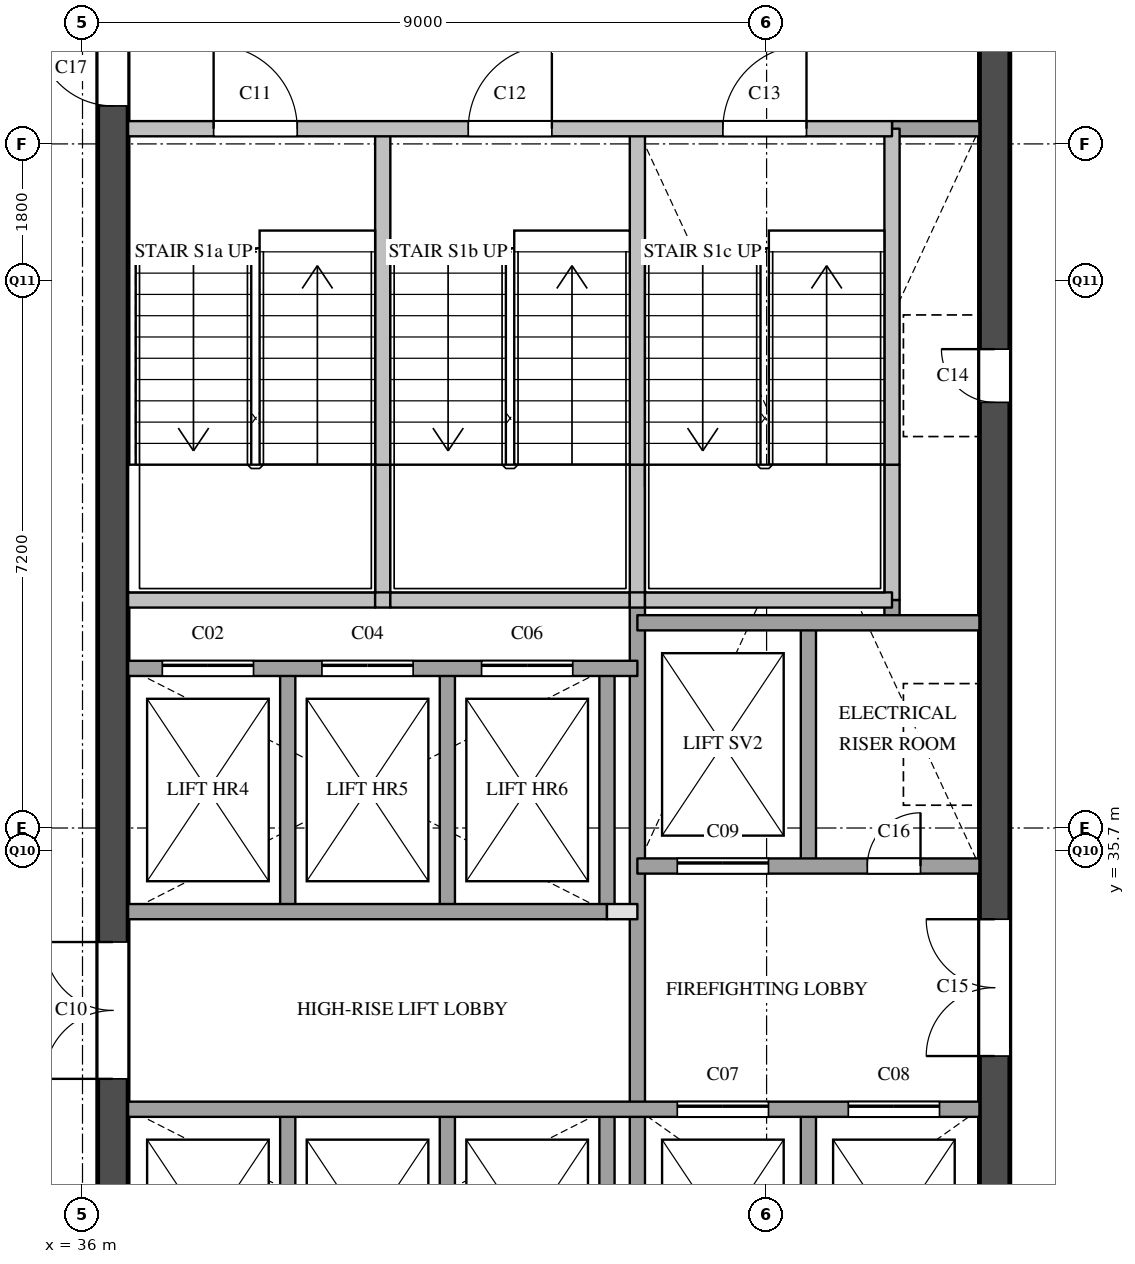
"""IFC4 building model, lengths in metres.
Left out: names, types, materials, properties, quantities, classifications, styles, units other than length and angle.
Written with IfcOpenShell. Run it as: python <this file> out.ifc"""

import sys

from ifc_helpers import new_model, si_unit, direction, frame, frame_2d, origin, place, context, subcontext, project, spatial, rectangle, extrude, element, fill, save


model = new_model("IFC4")
c1 = context("Model", 3, precision=1e-05, world=origin(), true_north=direction((0.0, 1.0)))
c2 = subcontext(c1, "Body", "Model", "MODEL_VIEW")
j1 = project(units=[si_unit("LENGTHUNIT", "METRE"), si_unit("PLANEANGLEUNIT", "RADIAN")], contexts=[c1])
p1 = place(None, origin())
s1 = spatial("IfcSite", under=j1, at=p1, CompositionType="ELEMENT")
p2 = place(p1, origin())
s2 = spatial("IfcBuilding", under=s1, at=p2, CompositionType="ELEMENT")
p3 = place(p2, frame((0.0, 0.0, 265.7)))
s3 = spatial("IfcBuildingStorey", under=s2, at=p3, CompositionType="ELEMENT", Elevation=265.7)
p4 = place(p3, frame((36.4, 29.1, 0.0), z_axis=(0.0, 0.0, 1.0), x_axis=(0.0, 1.0, 0.0)))
e1 = element("IfcWall", 1, at=p4, inside=s3, PredefinedType="SHEAR", context=c2, shape_type="SweptSolid", body=[
    extrude(rectangle(XDim=20.3, YDim=0.4, at=frame_2d((10.15, 0.0))), origin(), (0.0, 0.0, 1.0), 3.6),
])
p5 = place(p4, frame((3.6, 0.0, 0.0)))
e2 = element("IfcOpeningElement", 2, at=p5, cuts=e1, PredefinedType="OPENING", context=c2, shape_type="SweptSolid", body=[
    extrude(rectangle(XDim=1.8, YDim=2.1, at=frame_2d((0.9, 1.05))), frame((0.0, 0.21, 0.0), z_axis=(0.0, -1.0, 0.0), x_axis=(1.0, 0.0, 0.0)), (0.0, 0.0, 1.0), 0.42),
])
p6 = place(p4, frame((16.4, 0.0, 0.0)))
e3 = element("IfcOpeningElement", 3, at=p6, cuts=e1, PredefinedType="OPENING", context=c2, shape_type="SweptSolid", body=[
    extrude(rectangle(XDim=1.0, YDim=2.1, at=frame_2d((0.5, 1.05))), frame((0.0, 0.21, 0.0), z_axis=(0.0, -1.0, 0.0), x_axis=(1.0, 0.0, 0.0)), (0.0, 0.0, 1.0), 0.42),
])
p7 = place(p3, frame((48.0, 29.1, 0.0), z_axis=(0.0, 0.0, 1.0), x_axis=(0.0, 1.0, 0.0)))
e4 = element("IfcWall", 4, at=p7, inside=s3, PredefinedType="SHEAR", context=c2, shape_type="SweptSolid", body=[
    extrude(rectangle(XDim=20.3, YDim=0.4, at=frame_2d((10.15, 0.0))), origin(), (0.0, 0.0, 1.0), 3.6),
])
p8 = place(p7, frame((12.5, 0.0, 0.0)))
e5 = element("IfcOpeningElement", 5, at=p8, cuts=e4, PredefinedType="OPENING", context=c2, shape_type="SweptSolid", body=[
    extrude(rectangle(XDim=0.7, YDim=2.1, at=frame_2d((0.35, 1.05))), frame((0.0, 0.21, 0.0), z_axis=(0.0, -1.0, 0.0), x_axis=(1.0, 0.0, 0.0)), (0.0, 0.0, 1.0), 0.42),
])
p9 = place(p7, frame((3.9, 0.0, 0.0)))
e6 = element("IfcOpeningElement", 6, at=p9, cuts=e4, PredefinedType="OPENING", context=c2, shape_type="SweptSolid", body=[
    extrude(rectangle(XDim=1.8, YDim=2.1, at=frame_2d((0.9, 1.05))), frame((0.0, 0.21, 0.0), z_axis=(0.0, -1.0, 0.0), x_axis=(1.0, 0.0, 0.0)), (0.0, 0.0, 1.0), 0.42),
])
p10 = place(p3, frame((38.7, 29.1, 0.0), z_axis=(0.0, 0.0, 1.0), x_axis=(0.0, 1.0, 0.0)))
e7 = element("IfcWall", 7, at=p10, inside=s3, PredefinedType="SOLIDWALL", context=c2, shape_type="SweptSolid", body=[
    extrude(rectangle(XDim=3.2, YDim=0.2, at=frame_2d((1.6, 0.0))), origin(), (0.0, 0.0, 1.0), 3.6),
])
p11 = place(p3, frame((38.7, 34.9, 0.0), z_axis=(0.0, 0.0, 1.0), x_axis=(0.0, 1.0, 0.0)))
e8 = element("IfcWall", 8, at=p11, inside=s3, PredefinedType="SOLIDWALL", context=c2, shape_type="SweptSolid", body=[
    extrude(rectangle(XDim=3.2, YDim=0.2, at=frame_2d((1.6, 0.0))), origin(), (0.0, 0.0, 1.0), 3.6),
])
p12 = place(p3, frame((39.95, 39.0, 0.0), z_axis=(0.0, 0.0, 1.0), x_axis=(0.0, 1.0, 0.0)))
e9 = element("IfcWall", 9, at=p12, inside=s3, PredefinedType="SOLIDWALL", context=c2, shape_type="SweptSolid", body=[
    extrude(rectangle(XDim=1.78, YDim=0.2, at=frame_2d((0.89, 0.0))), origin(), (0.0, 0.0, 1.0), 3.6),
])
p13 = place(p3, frame((39.95, 40.78, 0.0), z_axis=(0.0, 0.0, 1.0), x_axis=(0.0, 1.0, 0.0)))
e10 = element("IfcWall", 10, at=p13, inside=s3, PredefinedType="SOLIDWALL", context=c2, shape_type="SweptSolid", body=[
    extrude(rectangle(XDim=4.42, YDim=0.2, at=frame_2d((2.21, 0.0))), origin(), (0.0, 0.0, 1.0), 3.6),
])
p14 = place(p3, frame((40.8, 29.1, 0.0), z_axis=(0.0, 0.0, 1.0), x_axis=(0.0, 1.0, 0.0)))
e11 = element("IfcWall", 11, at=p14, inside=s3, PredefinedType="SOLIDWALL", context=c2, shape_type="SweptSolid", body=[
    extrude(rectangle(XDim=3.2, YDim=0.2, at=frame_2d((1.6, 0.0))), origin(), (0.0, 0.0, 1.0), 3.6),
])
p15 = place(p3, frame((40.8, 34.9, 0.0), z_axis=(0.0, 0.0, 1.0), x_axis=(0.0, 1.0, 0.0)))
e12 = element("IfcWall", 12, at=p15, inside=s3, PredefinedType="SOLIDWALL", context=c2, shape_type="SweptSolid", body=[
    extrude(rectangle(XDim=3.2, YDim=0.2, at=frame_2d((1.6, 0.0))), origin(), (0.0, 0.0, 1.0), 3.6),
])
p16 = place(p3, frame((42.9, 29.1, 0.0), z_axis=(0.0, 0.0, 1.0), x_axis=(0.0, 1.0, 0.0)))
e13 = element("IfcWall", 13, at=p16, inside=s3, PredefinedType="SOLIDWALL", context=c2, shape_type="SweptSolid", body=[
    extrude(rectangle(XDim=3.2, YDim=0.2, at=frame_2d((1.6, 0.0))), origin(), (0.0, 0.0, 1.0), 3.6),
])
p17 = place(p3, frame((42.9, 34.9, 0.0), z_axis=(0.0, 0.0, 1.0), x_axis=(0.0, 1.0, 0.0)))
e14 = element("IfcWall", 14, at=p17, inside=s3, PredefinedType="SOLIDWALL", context=c2, shape_type="SweptSolid", body=[
    extrude(rectangle(XDim=3.2, YDim=0.2, at=frame_2d((1.6, 0.0))), origin(), (0.0, 0.0, 1.0), 3.6),
])
p18 = place(p3, frame((43.3, 29.1, 0.0), z_axis=(0.0, 0.0, 1.0), x_axis=(0.0, 1.0, 0.0)))
e15 = element("IfcWall", 15, at=p18, inside=s3, PredefinedType="SOLIDWALL", context=c2, shape_type="SweptSolid", body=[
    extrude(rectangle(XDim=9.9, YDim=0.2, at=frame_2d((4.95, 0.0))), origin(), (0.0, 0.0, 1.0), 3.6),
])
p19 = place(p3, frame((43.3, 39.0, 0.0), z_axis=(0.0, 0.0, 1.0), x_axis=(0.0, 1.0, 0.0)))
e16 = element("IfcWall", 16, at=p19, inside=s3, PredefinedType="SOLIDWALL", context=c2, shape_type="SweptSolid", body=[
    extrude(rectangle(XDim=1.78, YDim=0.2, at=frame_2d((0.89, 0.0))), origin(), (0.0, 0.0, 1.0), 3.6),
])
p20 = place(p3, frame((43.3, 40.78, 0.0), z_axis=(0.0, 0.0, 1.0), x_axis=(0.0, 1.0, 0.0)))
e17 = element("IfcWall", 17, at=p20, inside=s3, PredefinedType="SOLIDWALL", context=c2, shape_type="SweptSolid", body=[
    extrude(rectangle(XDim=4.42, YDim=0.2, at=frame_2d((2.21, 0.0))), origin(), (0.0, 0.0, 1.0), 3.6),
])
for number, where, z_axis, x_axis in (
    (18, (45.55, 29.1, 0.0), (0.0, 0.0, 1.0), (0.0, 1.0, 0.0)),
    (19, (45.55, 35.5, 0.0), (0.0, 0.0, 1.0), (0.0, 1.0, 0.0)),
):
    element("IfcWall", number, at=place(p3, frame(where, z_axis=z_axis, x_axis=x_axis)), inside=s3, PredefinedType="SOLIDWALL", context=c2, shape_type="SweptSolid", body=[
        extrude(rectangle(XDim=3.2, YDim=0.2, at=frame_2d((1.6, 0.0))), origin(), (0.0, 0.0, 1.0), 3.6),
    ])
p21 = place(p3, frame((46.65, 38.7, 0.0), z_axis=(0.0, 0.0, 1.0), x_axis=(0.0, 1.0, 0.0)))
e20 = element("IfcWall", 20, at=p21, inside=s3, PredefinedType="SOLIDWALL", context=c2, shape_type="SweptSolid", body=[
    extrude(rectangle(XDim=0.3, YDim=0.2, at=frame_2d((0.15, 0.0))), origin(), (0.0, 0.0, 1.0), 3.6),
])
p22 = place(p3, frame((46.65, 39.0, 0.0), z_axis=(0.0, 0.0, 1.0), x_axis=(0.0, 1.0, 0.0)))
e21 = element("IfcWall", 21, at=p22, inside=s3, PredefinedType="SOLIDWALL", context=c2, shape_type="SweptSolid", body=[
    extrude(rectangle(XDim=1.78, YDim=0.2, at=frame_2d((0.89, 0.0))), origin(), (0.0, 0.0, 1.0), 3.6),
])
p23 = place(p3, frame((46.65, 40.78, 0.0), z_axis=(0.0, 0.0, 1.0), x_axis=(0.0, 1.0, 0.0)))
e22 = element("IfcWall", 22, at=p23, inside=s3, PredefinedType="SOLIDWALL", context=c2, shape_type="SweptSolid", body=[
    extrude(rectangle(XDim=4.42, YDim=0.2, at=frame_2d((2.21, 0.0))), origin(), (0.0, 0.0, 1.0), 3.6),
])
p24 = place(p3, frame((36.6, 32.3, 0.0), z_axis=(0.0, 0.0, 1.0), x_axis=(1.0, 0.0, 0.0)))
e23 = element("IfcWall", 23, at=p24, inside=s3, PredefinedType="SOLIDWALL", context=c2, shape_type="SweptSolid", body=[
    extrude(rectangle(XDim=11.2, YDim=0.2, at=frame_2d((5.6, 0.0))), origin(), (0.0, 0.0, 1.0), 3.6),
])
p25 = place(p24, frame((7.225, 0.0, 0.0)))
e24 = element("IfcOpeningElement", 24, at=p25, cuts=e23, PredefinedType="OPENING", context=c2, shape_type="SweptSolid", body=[
    extrude(rectangle(XDim=1.2, YDim=2.1, at=frame_2d((0.6, 1.05))), frame((0.0, 0.11, 0.0), z_axis=(0.0, -1.0, 0.0), x_axis=(1.0, 0.0, 0.0)), (0.0, 0.0, 1.0), 0.22),
])
p26 = place(p24, frame((9.475, 0.0, 0.0)))
e25 = element("IfcOpeningElement", 25, at=p26, cuts=e23, PredefinedType="OPENING", context=c2, shape_type="SweptSolid", body=[
    extrude(rectangle(XDim=1.2, YDim=2.1, at=frame_2d((0.6, 1.05))), frame((0.0, 0.11, 0.0), z_axis=(0.0, -1.0, 0.0), x_axis=(1.0, 0.0, 0.0)), (0.0, 0.0, 1.0), 0.22),
])
p27 = place(p3, frame((42.9, 34.9, 0.0), z_axis=(0.0, 0.0, 1.0), x_axis=(1.0, 0.0, 0.0)))
e26 = element("IfcWall", 26, at=p27, inside=s3, PredefinedType="PARTITIONING", context=c2, shape_type="SweptSolid", body=[
    extrude(rectangle(XDim=0.4, YDim=0.2, at=frame_2d((0.2, 0.0))), origin(), (0.0, 0.0, 1.0), 3.6),
])
p28 = place(p3, frame((36.6, 34.9, 0.0), z_axis=(0.0, 0.0, 1.0), x_axis=(1.0, 0.0, 0.0)))
e27 = element("IfcWall", 27, at=p28, inside=s3, PredefinedType="SOLIDWALL", context=c2, shape_type="SweptSolid", body=[
    extrude(rectangle(XDim=6.3, YDim=0.2, at=frame_2d((3.15, 0.0))), origin(), (0.0, 0.0, 1.0), 3.6),
])
p29 = place(p3, frame((43.3, 35.5, 0.0), z_axis=(0.0, 0.0, 1.0), x_axis=(1.0, 0.0, 0.0)))
e28 = element("IfcWall", 28, at=p29, inside=s3, PredefinedType="SOLIDWALL", context=c2, shape_type="SweptSolid", body=[
    extrude(rectangle(XDim=4.5, YDim=0.2, at=frame_2d((2.25, 0.0))), origin(), (0.0, 0.0, 1.0), 3.6),
])
p30 = place(p29, frame((0.525, 0.0, 0.0)))
e29 = element("IfcOpeningElement", 29, at=p30, cuts=e28, PredefinedType="OPENING", context=c2, shape_type="SweptSolid", body=[
    extrude(rectangle(XDim=1.2, YDim=2.1, at=frame_2d((0.6, 1.05))), frame((0.0, 0.11, 0.0), z_axis=(0.0, -1.0, 0.0), x_axis=(1.0, 0.0, 0.0)), (0.0, 0.0, 1.0), 0.22),
])
p31 = place(p29, frame((3.025, 0.0, 0.0)))
e30 = element("IfcOpeningElement", 30, at=p31, cuts=e28, PredefinedType="OPENING", context=c2, shape_type="SweptSolid", body=[
    extrude(rectangle(XDim=0.7, YDim=2.1, at=frame_2d((0.35, 1.05))), frame((0.0, 0.11, 0.0), z_axis=(0.0, -1.0, 0.0), x_axis=(1.0, 0.0, 0.0)), (0.0, 0.0, 1.0), 0.22),
])
p32 = place(p3, frame((36.6, 38.1, 0.0), z_axis=(0.0, 0.0, 1.0), x_axis=(1.0, 0.0, 0.0)))
e31 = element("IfcWall", 31, at=p32, inside=s3, PredefinedType="SOLIDWALL", context=c2, shape_type="SweptSolid", body=[
    extrude(rectangle(XDim=6.7, YDim=0.2, at=frame_2d((3.35, 0.0))), origin(), (0.0, 0.0, 1.0), 3.6),
])
p33 = place(p32, frame((0.45, 0.0, 0.0)))
e32 = element("IfcOpeningElement", 32, at=p33, cuts=e31, PredefinedType="OPENING", context=c2, shape_type="SweptSolid", body=[
    extrude(rectangle(XDim=1.2, YDim=2.1, at=frame_2d((0.6, 1.05))), frame((0.0, 0.11, 0.0), z_axis=(0.0, -1.0, 0.0), x_axis=(1.0, 0.0, 0.0)), (0.0, 0.0, 1.0), 0.22),
])
p34 = place(p32, frame((2.55, 0.0, 0.0)))
e33 = element("IfcOpeningElement", 33, at=p34, cuts=e31, PredefinedType="OPENING", context=c2, shape_type="SweptSolid", body=[
    extrude(rectangle(XDim=1.2, YDim=2.1, at=frame_2d((0.6, 1.05))), frame((0.0, 0.11, 0.0), z_axis=(0.0, -1.0, 0.0), x_axis=(1.0, 0.0, 0.0)), (0.0, 0.0, 1.0), 0.22),
])
p35 = place(p32, frame((4.65, 0.0, 0.0)))
e34 = element("IfcOpeningElement", 34, at=p35, cuts=e31, PredefinedType="OPENING", context=c2, shape_type="SweptSolid", body=[
    extrude(rectangle(XDim=1.2, YDim=2.1, at=frame_2d((0.6, 1.05))), frame((0.0, 0.11, 0.0), z_axis=(0.0, -1.0, 0.0), x_axis=(1.0, 0.0, 0.0)), (0.0, 0.0, 1.0), 0.22),
])
p36 = place(p3, frame((43.3, 38.7, 0.0), z_axis=(0.0, 0.0, 1.0), x_axis=(1.0, 0.0, 0.0)))
e35 = element("IfcWall", 35, at=p36, inside=s3, PredefinedType="SOLIDWALL", context=c2, shape_type="SweptSolid", body=[
    extrude(rectangle(XDim=4.5, YDim=0.2, at=frame_2d((2.25, 0.0))), origin(), (0.0, 0.0, 1.0), 3.6),
])
p37 = place(p3, frame((36.6, 39.0, 0.0), z_axis=(0.0, 0.0, 1.0), x_axis=(1.0, 0.0, 0.0)))
e36 = element("IfcWall", 36, at=p37, inside=s3, PredefinedType="SOLIDWALL", context=c2, shape_type="SweptSolid", body=[
    extrude(rectangle(XDim=3.25, YDim=0.2, at=frame_2d((1.625, 0.0))), origin(), (0.0, 0.0, 1.0), 3.6),
])
p38 = place(p3, frame((39.85, 39.0, 0.0), z_axis=(0.0, 0.0, 1.0), x_axis=(1.0, 0.0, 0.0)))
e37 = element("IfcWall", 37, at=p38, inside=s3, PredefinedType="SOLIDWALL", context=c2, shape_type="SweptSolid", body=[
    extrude(rectangle(XDim=0.2, YDim=0.2, at=frame_2d((0.1, 0.0))), origin(), (0.0, 0.0, 1.0), 3.6),
])
p39 = place(p3, frame((40.05, 39.0, 0.0), z_axis=(0.0, 0.0, 1.0), x_axis=(1.0, 0.0, 0.0)))
e38 = element("IfcWall", 38, at=p39, inside=s3, PredefinedType="SOLIDWALL", context=c2, shape_type="SweptSolid", body=[
    extrude(rectangle(XDim=3.15, YDim=0.2, at=frame_2d((1.575, 0.0))), origin(), (0.0, 0.0, 1.0), 3.6),
])
p40 = place(p3, frame((43.2, 39.0, 0.0), z_axis=(0.0, 0.0, 1.0), x_axis=(1.0, 0.0, 0.0)))
e39 = element("IfcWall", 39, at=p40, inside=s3, PredefinedType="SOLIDWALL", context=c2, shape_type="SweptSolid", body=[
    extrude(rectangle(XDim=0.2, YDim=0.2, at=frame_2d((0.1, 0.0))), origin(), (0.0, 0.0, 1.0), 3.6),
])
p41 = place(p3, frame((43.4, 39.0, 0.0), z_axis=(0.0, 0.0, 1.0), x_axis=(1.0, 0.0, 0.0)))
e40 = element("IfcWall", 40, at=p41, inside=s3, PredefinedType="SOLIDWALL", context=c2, shape_type="SweptSolid", body=[
    extrude(rectangle(XDim=3.25, YDim=0.2, at=frame_2d((1.625, 0.0))), origin(), (0.0, 0.0, 1.0), 3.6),
])
p42 = place(p3, frame((46.65, 45.2, 0.0), z_axis=(0.0, 0.0, 1.0), x_axis=(1.0, 0.0, 0.0)))
e41 = element("IfcWall", 41, at=p42, inside=s3, PredefinedType="SOLIDWALL", context=c2, shape_type="SweptSolid", body=[
    extrude(rectangle(XDim=1.15, YDim=0.2, at=frame_2d((0.575, 0.0))), origin(), (0.0, 0.0, 1.0), 3.6),
])
p43 = place(p3, frame((36.6, 45.2, 0.0), z_axis=(0.0, 0.0, 1.0), x_axis=(1.0, 0.0, 0.0)))
e42 = element("IfcWall", 42, at=p43, inside=s3, PredefinedType="SOLIDWALL", context=c2, shape_type="SweptSolid", body=[
    extrude(rectangle(XDim=10.05, YDim=0.2, at=frame_2d((5.025, 0.0))), origin(), (0.0, 0.0, 1.0), 3.6),
])
p44 = place(p43, frame((1.125, 0.0, 0.0)))
e43 = element("IfcOpeningElement", 43, at=p44, cuts=e42, PredefinedType="OPENING", context=c2, shape_type="SweptSolid", body=[
    extrude(rectangle(XDim=1.1, YDim=2.1, at=frame_2d((0.55, 1.05))), frame((0.0, 0.11, 0.0), z_axis=(0.0, -1.0, 0.0), x_axis=(1.0, 0.0, 0.0)), (0.0, 0.0, 1.0), 0.22),
])
p45 = place(p43, frame((4.475, 0.0, 0.0)))
e44 = element("IfcOpeningElement", 44, at=p45, cuts=e42, PredefinedType="OPENING", context=c2, shape_type="SweptSolid", body=[
    extrude(rectangle(XDim=1.1, YDim=2.1, at=frame_2d((0.55, 1.05))), frame((0.0, 0.11, 0.0), z_axis=(0.0, -1.0, 0.0), x_axis=(1.0, 0.0, 0.0)), (0.0, 0.0, 1.0), 0.22),
])
p46 = place(p43, frame((7.825, 0.0, 0.0)))
e45 = element("IfcOpeningElement", 45, at=p46, cuts=e42, PredefinedType="OPENING", context=c2, shape_type="SweptSolid", body=[
    extrude(rectangle(XDim=1.1, YDim=2.1, at=frame_2d((0.55, 1.05))), frame((0.0, 0.11, 0.0), z_axis=(0.0, -1.0, 0.0), x_axis=(1.0, 0.0, 0.0)), (0.0, 0.0, 1.0), 0.22),
])
p47 = place(p33, origin())
e46 = element("IfcDoor", 46, at=p47, inside=s3, OperationType="SLIDING_TO_LEFT", PredefinedType="DOOR", context=c2, shape_type="SweptSolid", body=[
    extrude(rectangle(XDim=1.2, YDim=2.1, at=frame_2d((0.6, 1.05))), frame((0.0, 0.025, 0.0), z_axis=(0.0, -1.0, 0.0), x_axis=(1.0, 0.0, 0.0)), (0.0, 0.0, 1.0), 0.05),
])
fill(e32, e46)
p48 = place(p34, origin())
e47 = element("IfcDoor", 47, at=p48, inside=s3, OperationType="SLIDING_TO_LEFT", PredefinedType="DOOR", context=c2, shape_type="SweptSolid", body=[
    extrude(rectangle(XDim=1.2, YDim=2.1, at=frame_2d((0.6, 1.05))), frame((0.0, 0.025, 0.0), z_axis=(0.0, -1.0, 0.0), x_axis=(1.0, 0.0, 0.0)), (0.0, 0.0, 1.0), 0.05),
])
fill(e33, e47)
p49 = place(p35, origin())
e48 = element("IfcDoor", 48, at=p49, inside=s3, OperationType="SLIDING_TO_LEFT", PredefinedType="DOOR", context=c2, shape_type="SweptSolid", body=[
    extrude(rectangle(XDim=1.2, YDim=2.1, at=frame_2d((0.6, 1.05))), frame((0.0, 0.025, 0.0), z_axis=(0.0, -1.0, 0.0), x_axis=(1.0, 0.0, 0.0)), (0.0, 0.0, 1.0), 0.05),
])
fill(e34, e48)
p50 = place(p25, origin())
e49 = element("IfcDoor", 49, at=p50, inside=s3, OperationType="SLIDING_TO_LEFT", PredefinedType="DOOR", context=c2, shape_type="SweptSolid", body=[
    extrude(rectangle(XDim=1.2, YDim=2.1, at=frame_2d((0.6, 1.05))), frame((0.0, 0.025, 0.0), z_axis=(0.0, -1.0, 0.0), x_axis=(1.0, 0.0, 0.0)), (0.0, 0.0, 1.0), 0.05),
])
fill(e24, e49)
p51 = place(p26, origin())
e50 = element("IfcDoor", 50, at=p51, inside=s3, OperationType="SLIDING_TO_LEFT", PredefinedType="DOOR", context=c2, shape_type="SweptSolid", body=[
    extrude(rectangle(XDim=1.2, YDim=2.1, at=frame_2d((0.6, 1.05))), frame((0.0, 0.025, 0.0), z_axis=(0.0, -1.0, 0.0), x_axis=(1.0, 0.0, 0.0)), (0.0, 0.0, 1.0), 0.05),
])
fill(e25, e50)
p52 = place(p30, origin())
e51 = element("IfcDoor", 51, at=p52, inside=s3, OperationType="SLIDING_TO_LEFT", PredefinedType="DOOR", context=c2, shape_type="SweptSolid", body=[
    extrude(rectangle(XDim=1.2, YDim=2.1, at=frame_2d((0.6, 1.05))), frame((0.0, 0.025, 0.0), z_axis=(0.0, -1.0, 0.0), x_axis=(1.0, 0.0, 0.0)), (0.0, 0.0, 1.0), 0.05),
])
fill(e29, e51)
p53 = place(p5, origin())
e52 = element("IfcDoor", 52, at=p53, inside=s3, OperationType="DOUBLE_DOOR_SINGLE_SWING", PredefinedType="DOOR", context=c2, shape_type="SweptSolid", body=[
    extrude(rectangle(XDim=1.8, YDim=2.1, at=frame_2d((0.9, 1.05))), frame((0.0, 0.025, 0.0), z_axis=(0.0, -1.0, 0.0), x_axis=(1.0, 0.0, 0.0)), (0.0, 0.0, 1.0), 0.05),
])
fill(e2, e52)
p54 = place(p44, origin())
e53 = element("IfcDoor", 53, at=p54, inside=s3, OperationType="SINGLE_SWING_LEFT", PredefinedType="DOOR", context=c2, shape_type="SweptSolid", body=[
    extrude(rectangle(XDim=1.1, YDim=2.1, at=frame_2d((0.55, 1.05))), frame((0.0, 0.025, 0.0), z_axis=(0.0, -1.0, 0.0), x_axis=(1.0, 0.0, 0.0)), (0.0, 0.0, 1.0), 0.05),
])
fill(e43, e53)
p55 = place(p45, origin())
e54 = element("IfcDoor", 54, at=p55, inside=s3, OperationType="SINGLE_SWING_RIGHT", PredefinedType="DOOR", context=c2, shape_type="SweptSolid", body=[
    extrude(rectangle(XDim=1.1, YDim=2.1, at=frame_2d((0.55, 1.05))), frame((0.0, 0.025, 0.0), z_axis=(0.0, -1.0, 0.0), x_axis=(1.0, 0.0, 0.0)), (0.0, 0.0, 1.0), 0.05),
])
fill(e44, e54)
p56 = place(p46, origin())
e55 = element("IfcDoor", 55, at=p56, inside=s3, OperationType="SINGLE_SWING_RIGHT", PredefinedType="DOOR", context=c2, shape_type="SweptSolid", body=[
    extrude(rectangle(XDim=1.1, YDim=2.1, at=frame_2d((0.55, 1.05))), frame((0.0, 0.025, 0.0), z_axis=(0.0, -1.0, 0.0), x_axis=(1.0, 0.0, 0.0)), (0.0, 0.0, 1.0), 0.05),
])
fill(e45, e55)
p57 = place(p8, origin())
e56 = element("IfcDoor", 56, at=p57, inside=s3, OperationType="SINGLE_SWING_RIGHT", PredefinedType="DOOR", context=c2, shape_type="SweptSolid", body=[
    extrude(rectangle(XDim=0.7, YDim=2.1, at=frame_2d((0.35, 1.05))), frame((0.0, 0.025, 0.0), z_axis=(0.0, -1.0, 0.0), x_axis=(1.0, 0.0, 0.0)), (0.0, 0.0, 1.0), 0.05),
])
fill(e5, e56)
p58 = place(p9, origin())
e57 = element("IfcDoor", 57, at=p58, inside=s3, OperationType="DOUBLE_DOOR_SINGLE_SWING", PredefinedType="DOOR", context=c2, shape_type="SweptSolid", body=[
    extrude(rectangle(XDim=1.8, YDim=2.1, at=frame_2d((0.9, 1.05))), frame((0.0, 0.025, 0.0), z_axis=(0.0, -1.0, 0.0), x_axis=(1.0, 0.0, 0.0)), (0.0, 0.0, 1.0), 0.05),
])
fill(e6, e57)
p59 = place(p31, origin())
e58 = element("IfcDoor", 58, at=p59, inside=s3, OperationType="SINGLE_SWING_RIGHT", PredefinedType="DOOR", context=c2, shape_type="SweptSolid", body=[
    extrude(rectangle(XDim=0.7, YDim=2.1, at=frame_2d((0.35, 1.05))), frame((0.0, 0.025, 0.0), z_axis=(0.0, -1.0, 0.0), x_axis=(1.0, 0.0, 0.0)), (0.0, 0.0, 1.0), 0.05),
])
fill(e30, e58)
p60 = place(p6, origin())
e59 = element("IfcDoor", 59, at=p60, inside=s3, OperationType="SINGLE_SWING_RIGHT", PredefinedType="DOOR", context=c2, shape_type="SweptSolid", body=[
    extrude(rectangle(XDim=1.0, YDim=2.1, at=frame_2d((0.5, 1.05))), frame((0.0, 0.025, 0.0), z_axis=(0.0, -1.0, 0.0), x_axis=(1.0, 0.0, 0.0)), (0.0, 0.0, 1.0), 0.05),
])
fill(e3, e59)
save(model, sys.argv[1])
